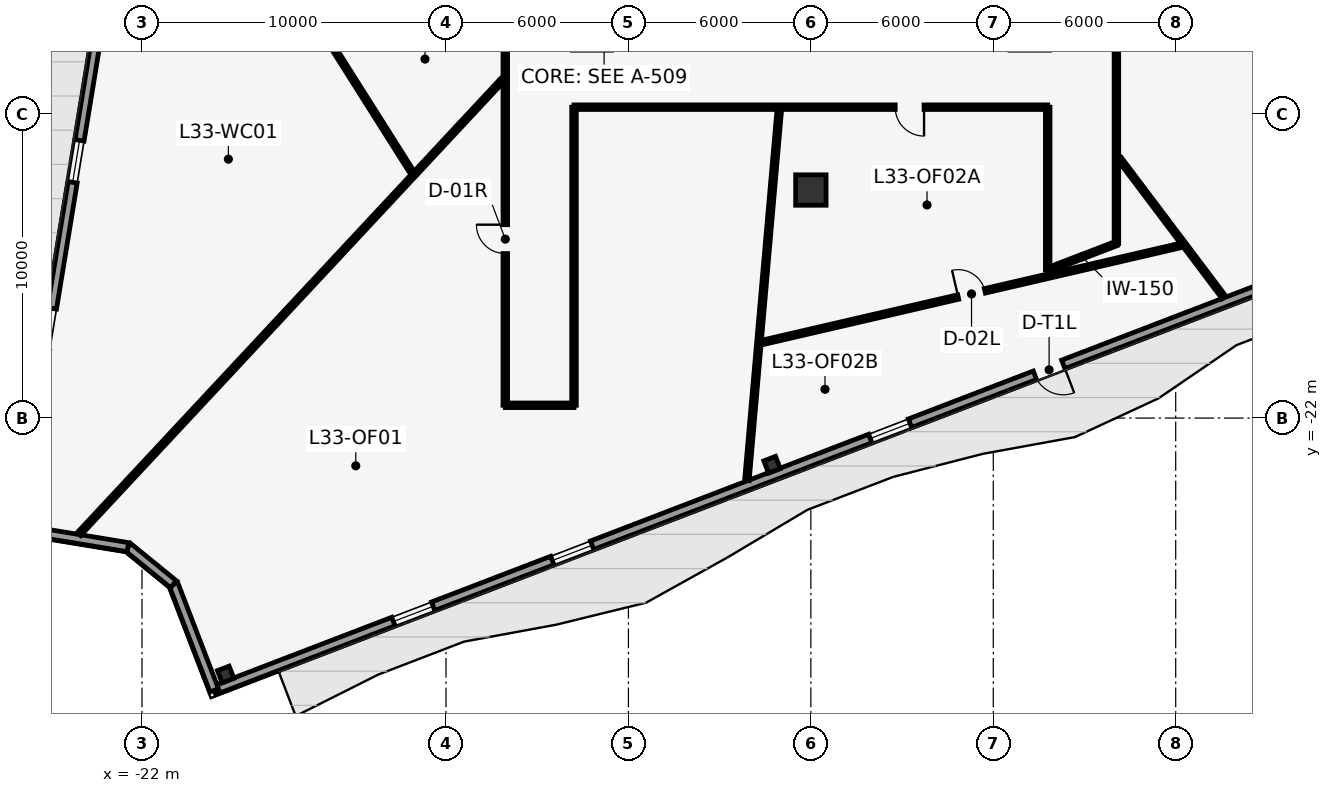
"""IFC4 building model, lengths in metres.
Left out: names, types, materials, properties, quantities, classifications, styles, units other than length and angle.
Written with IfcOpenShell. Run it as: python <this file> out.ifc"""

import sys

from ifc_helpers import new_model, si_unit, direction, frame, frame_2d, origin, origin_2d, place, context, subcontext, project, spatial, rectangle, i_section, extrude, element, fill, save


model = new_model("IFC4")
c1 = context("Model", 3, precision=1e-05, world=origin(), true_north=direction((0.0, 1.0)))
c2 = subcontext(c1, "Body", "Model", "MODEL_VIEW")
j1 = project(units=[si_unit("LENGTHUNIT", "METRE"), si_unit("PLANEANGLEUNIT", "RADIAN")], contexts=[c1])
p1 = place(None, origin())
s1 = spatial("IfcSite", under=j1, at=p1, CompositionType="ELEMENT")
p2 = place(p1, origin())
s2 = spatial("IfcBuilding", under=s1, at=p2, CompositionType="ELEMENT")
p3 = place(p2, frame((0.0, 0.0, 144.5)))
s3 = spatial("IfcBuildingStorey", under=s2, at=p3, CompositionType="ELEMENT", Elevation=144.5)
p4 = place(p3, frame((0.0, -14.5, 0.0), z_axis=(0.0, 0.0, 1.0), x_axis=(1.0, 0.0, 0.0)))
e1 = element("IfcColumn", 1, at=p4, inside=s3, PredefinedType="COLUMN", context=c2, shape_type="SweptSolid", body=[
    extrude(rectangle(XDim=1.0, YDim=1.0, at=origin_2d()), origin(), (0.0, 0.0, 1.0), 4.1),
])
for number, where, z_axis, x_axis in (
    (2, (-19.247, -30.435, 0.0), (0.0, 0.0, 1.0), (0.934, 0.358, 0.0)),
    (3, (-1.275, -23.537, 0.0), (0.0, 0.0, 1.0), (0.934, 0.358, 0.0)),
):
    element("IfcColumn", number, at=place(p3, frame(where, z_axis=z_axis, x_axis=x_axis)), inside=s3, PredefinedType="COLUMN", context=c2, shape_type="SweptSolid", body=[
        extrude(i_section(OverallWidth=0.411, OverallDepth=0.434, WebThickness=0.036, FlangeThickness=0.057, at=origin_2d()), origin(), (0.0, 0.0, 1.0), 4.1),
    ])
p5 = place(p3, frame((35.296, -9.873, 0.0), z_axis=(0.0, 0.0, 1.0), x_axis=(-0.933580612554, -0.35836746485, 0.0)))
e4 = element("IfcWall", 4, at=p5, inside=s3, PredefinedType="STANDARD", context=c2, shape_type="SweptSolid", body=[
    extrude(rectangle(XDim=58.828, YDim=0.3, at=frame_2d((29.414, 0.0))), origin(), (0.0, 0.0, 1.0), 3.85),
])
p6 = place(p5, frame((28.914, 0.0, 0.0)))
e5 = element("IfcOpeningElement", 5, at=p6, cuts=e4, PredefinedType="OPENING", context=c2, shape_type="SweptSolid", body=[
    extrude(rectangle(XDim=1.0, YDim=2.15, at=frame_2d((0.5, 1.075))), frame((0.0, 0.16, 0.0), z_axis=(0.0, -1.0, 0.0), x_axis=(1.0, 0.0, 0.0)), (0.0, 0.0, 1.0), 0.32),
])
p7 = place(p5, frame((6.314, 0.0, 0.85)))
e6 = element("IfcOpeningElement", 6, at=p7, cuts=e4, PredefinedType="OPENING", context=c2, shape_type="SweptSolid", body=[
    extrude(rectangle(XDim=1.4, YDim=2.2, at=frame_2d((0.7, 1.1))), frame((0.0, 0.16, 0.0), z_axis=(0.0, -1.0, 0.0), x_axis=(1.0, 0.0, 0.0)), (0.0, 0.0, 1.0), 0.32),
])
p8 = place(p5, frame((11.914, 0.0, 0.85)))
e7 = element("IfcOpeningElement", 7, at=p8, cuts=e4, PredefinedType="OPENING", context=c2, shape_type="SweptSolid", body=[
    extrude(rectangle(XDim=1.4, YDim=2.2, at=frame_2d((0.7, 1.1))), frame((0.0, 0.16, 0.0), z_axis=(0.0, -1.0, 0.0), x_axis=(1.0, 0.0, 0.0)), (0.0, 0.0, 1.0), 0.32),
])
p9 = place(p5, frame((34.314, 0.0, 0.85)))
e8 = element("IfcOpeningElement", 8, at=p9, cuts=e4, PredefinedType="OPENING", context=c2, shape_type="SweptSolid", body=[
    extrude(rectangle(XDim=1.4, YDim=2.2, at=frame_2d((0.7, 1.1))), frame((0.0, 0.16, 0.0), z_axis=(0.0, -1.0, 0.0), x_axis=(1.0, 0.0, 0.0)), (0.0, 0.0, 1.0), 0.32),
])
p10 = place(p5, frame((45.514, 0.0, 0.85)))
e9 = element("IfcOpeningElement", 9, at=p10, cuts=e4, PredefinedType="OPENING", context=c2, shape_type="SweptSolid", body=[
    extrude(rectangle(XDim=1.4, YDim=2.2, at=frame_2d((0.7, 1.1))), frame((0.0, 0.16, 0.0), z_axis=(0.0, -1.0, 0.0), x_axis=(1.0, 0.0, 0.0)), (0.0, 0.0, 1.0), 0.32),
])
p11 = place(p5, frame((51.114, 0.0, 0.85)))
e10 = element("IfcOpeningElement", 10, at=p11, cuts=e4, PredefinedType="OPENING", context=c2, shape_type="SweptSolid", body=[
    extrude(rectangle(XDim=1.4, YDim=2.2, at=frame_2d((0.7, 1.1))), frame((0.0, 0.16, 0.0), z_axis=(0.0, -1.0, 0.0), x_axis=(1.0, 0.0, 0.0)), (0.0, 0.0, 1.0), 0.32),
])
p12 = place(p3, frame((-19.624, -30.955, 0.0), z_axis=(0.0, 0.0, 1.0), x_axis=(-0.358366059171, 0.933581152142, 0.0)))
e11 = element("IfcWall", 11, at=p12, inside=s3, PredefinedType="STANDARD", context=c2, shape_type="SweptSolid", body=[
    extrude(rectangle(XDim=3.737, YDim=0.3, at=frame_2d((1.868, 0.0))), origin(), (0.0, 0.0, 1.0), 3.85),
])
p13 = place(p3, frame((-20.963, -27.466, 0.0), z_axis=(0.0, 0.0, 1.0), x_axis=(-0.775367830134, 0.631509879569, 0.0)))
e12 = element("IfcWall", 12, at=p13, inside=s3, PredefinedType="STANDARD", context=c2, shape_type="SweptSolid", body=[
    extrude(rectangle(XDim=1.933, YDim=0.3, at=frame_2d((0.967, 0.0))), origin(), (0.0, 0.0, 1.0), 3.85),
])
p14 = place(p3, frame((-22.462, -26.246, 0.0), z_axis=(0.0, 0.0, 1.0), x_axis=(-0.986786597315, 0.16202534172, 0.0)))
e13 = element("IfcWall", 13, at=p14, inside=s3, PredefinedType="STANDARD", context=c2, shape_type="SweptSolid", body=[
    extrude(rectangle(XDim=3.737, YDim=0.3, at=frame_2d((1.868, 0.0))), origin(), (0.0, 0.0, 1.0), 3.85),
])
p15 = place(p3, frame((-26.15, -25.64, 0.0), z_axis=(0.0, 0.0, 1.0), x_axis=(0.161975761987, 0.986794736776, 0.0)))
e14 = element("IfcWall", 14, at=p15, inside=s3, PredefinedType="STANDARD", context=c2, shape_type="SweptSolid", body=[
    extrude(rectangle(XDim=58.093, YDim=0.3, at=frame_2d((29.046, 0.0))), origin(), (0.0, 0.0, 1.0), 3.85),
])
p16 = place(p15, frame((28.546, 0.0, 0.0)))
e15 = element("IfcOpeningElement", 15, at=p16, cuts=e14, PredefinedType="OPENING", context=c2, shape_type="SweptSolid", body=[
    extrude(rectangle(XDim=1.0, YDim=2.15, at=frame_2d((0.5, 1.075))), frame((0.0, 0.16, 0.0), z_axis=(0.0, -1.0, 0.0), x_axis=(1.0, 0.0, 0.0)), (0.0, 0.0, 1.0), 0.32),
])
p17 = place(p15, frame((5.947, 0.0, 0.85)))
e16 = element("IfcOpeningElement", 16, at=p17, cuts=e14, PredefinedType="OPENING", context=c2, shape_type="SweptSolid", body=[
    extrude(rectangle(XDim=1.4, YDim=2.2, at=frame_2d((0.7, 1.1))), frame((0.0, 0.16, 0.0), z_axis=(0.0, -1.0, 0.0), x_axis=(1.0, 0.0, 0.0)), (0.0, 0.0, 1.0), 0.32),
])
p18 = place(p15, frame((11.546, 0.0, 0.85)))
e17 = element("IfcOpeningElement", 17, at=p18, cuts=e14, PredefinedType="OPENING", context=c2, shape_type="SweptSolid", body=[
    extrude(rectangle(XDim=1.4, YDim=2.2, at=frame_2d((0.7, 1.1))), frame((0.0, 0.16, 0.0), z_axis=(0.0, -1.0, 0.0), x_axis=(1.0, 0.0, 0.0)), (0.0, 0.0, 1.0), 0.32),
])
p19 = place(p15, frame((17.146, 0.0, 0.85)))
e18 = element("IfcOpeningElement", 18, at=p19, cuts=e14, PredefinedType="OPENING", context=c2, shape_type="SweptSolid", body=[
    extrude(rectangle(XDim=1.4, YDim=2.2, at=frame_2d((0.7, 1.1))), frame((0.0, 0.16, 0.0), z_axis=(0.0, -1.0, 0.0), x_axis=(1.0, 0.0, 0.0)), (0.0, 0.0, 1.0), 0.32),
])
p20 = place(p15, frame((33.947, 0.0, 0.85)))
e19 = element("IfcOpeningElement", 19, at=p20, cuts=e14, PredefinedType="OPENING", context=c2, shape_type="SweptSolid", body=[
    extrude(rectangle(XDim=1.4, YDim=2.2, at=frame_2d((0.7, 1.1))), frame((0.0, 0.16, 0.0), z_axis=(0.0, -1.0, 0.0), x_axis=(1.0, 0.0, 0.0)), (0.0, 0.0, 1.0), 0.32),
])
p21 = place(p15, frame((39.546, 0.0, 0.85)))
e20 = element("IfcOpeningElement", 20, at=p21, cuts=e14, PredefinedType="OPENING", context=c2, shape_type="SweptSolid", body=[
    extrude(rectangle(XDim=1.4, YDim=2.2, at=frame_2d((0.7, 1.1))), frame((0.0, 0.16, 0.0), z_axis=(0.0, -1.0, 0.0), x_axis=(1.0, 0.0, 0.0)), (0.0, 0.0, 1.0), 0.32),
])
p22 = place(p15, frame((45.146, 0.0, 0.85)))
e21 = element("IfcOpeningElement", 21, at=p22, cuts=e14, PredefinedType="OPENING", context=c2, shape_type="SweptSolid", body=[
    extrude(rectangle(XDim=1.4, YDim=2.2, at=frame_2d((0.7, 1.1))), frame((0.0, 0.16, 0.0), z_axis=(0.0, -1.0, 0.0), x_axis=(1.0, 0.0, 0.0)), (0.0, 0.0, 1.0), 0.32),
])
p23 = place(p15, frame((50.747, 0.0, 0.85)))
e22 = element("IfcOpeningElement", 22, at=p23, cuts=e14, PredefinedType="OPENING", context=c2, shape_type="SweptSolid", body=[
    extrude(rectangle(XDim=1.4, YDim=2.2, at=frame_2d((0.7, 1.1))), frame((0.0, 0.16, 0.0), z_axis=(0.0, -1.0, 0.0), x_axis=(1.0, 0.0, 0.0)), (0.0, 0.0, 1.0), 0.32),
])
p24 = place(p3, frame((10.05, -16.26, 0.0), z_axis=(0.0, 0.0, 1.0), x_axis=(-0.933561171802, -0.358418105713, 0.0)))
e23 = element("IfcWall", 23, at=p24, inside=s3, PredefinedType="PARTITIONING", context=c2, shape_type="SweptSolid", body=[
    extrude(rectangle(XDim=2.421, YDim=0.15, at=frame_2d((1.21, 0.0))), origin(), (0.0, 0.0, 1.0), 3.85),
])
p25 = place(p3, frame((7.79, -17.127, 0.0), z_axis=(0.0, 0.0, 1.0), x_axis=(0.0, 1.0, 0.0)))
e24 = element("IfcWall", 24, at=p25, inside=s3, PredefinedType="PARTITIONING", context=c2, shape_type="SweptSolid", body=[
    extrude(rectangle(XDim=5.352, YDim=0.15, at=frame_2d((2.676, 0.0))), origin(), (0.0, 0.0, 1.0), 3.85),
])
p26 = place(p3, frame((7.79, -11.775, 0.0), z_axis=(0.0, 0.0, 1.0), x_axis=(-1.0, 0.0, 0.0)))
e25 = element("IfcWall", 25, at=p26, inside=s3, PredefinedType="PARTITIONING", context=c2, shape_type="SweptSolid", body=[
    extrude(rectangle(XDim=15.58, YDim=0.15, at=frame_2d((7.79, 0.0))), origin(), (0.0, 0.0, 1.0), 3.85),
])
p27 = place(p26, frame((4.067, 0.0, 0.0)))
e26 = element("IfcOpeningElement", 26, at=p27, cuts=e25, PredefinedType="OPENING", context=c2, shape_type="SweptSolid", body=[
    extrude(rectangle(XDim=0.95, YDim=2.15, at=frame_2d((0.475, 1.075))), frame((0.0, 0.085, 0.0), z_axis=(0.0, -1.0, 0.0), x_axis=(1.0, 0.0, 0.0)), (0.0, 0.0, 1.0), 0.17),
])
p28 = place(p3, frame((-7.79, -11.775, 0.0), z_axis=(0.0, 0.0, 1.0), x_axis=(0.0, -1.0, 0.0)))
e27 = element("IfcWall", 27, at=p28, inside=s3, PredefinedType="PARTITIONING", context=c2, shape_type="SweptSolid", body=[
    extrude(rectangle(XDim=9.805, YDim=0.15, at=frame_2d((4.903, 0.0))), origin(), (0.0, 0.0, 1.0), 3.85),
])
p29 = place(p3, frame((-7.79, -21.58, 0.0), z_axis=(0.0, 0.0, 1.0), x_axis=(-1.0, 0.0, 0.0)))
e28 = element("IfcWall", 28, at=p29, inside=s3, PredefinedType="PARTITIONING", context=c2, shape_type="SweptSolid", body=[
    extrude(rectangle(XDim=2.26, YDim=0.15, at=frame_2d((1.13, 0.0))), origin(), (0.0, 0.0, 1.0), 3.85),
])
p30 = place(p3, frame((-10.05, -21.58, 0.0), z_axis=(0.0, 0.0, 1.0), x_axis=(0.0, 1.0, 0.0)))
e29 = element("IfcWall", 29, at=p30, inside=s3, PredefinedType="PARTITIONING", context=c2, shape_type="SweptSolid", body=[
    extrude(rectangle(XDim=19.45, YDim=0.15, at=frame_2d((9.725, 0.0))), origin(), (0.0, 0.0, 1.0), 3.85),
])
p31 = place(p30, frame((4.99, 0.0, 0.0)))
e30 = element("IfcOpeningElement", 30, at=p31, cuts=e29, PredefinedType="OPENING", context=c2, shape_type="SweptSolid", body=[
    extrude(rectangle(XDim=0.95, YDim=2.15, at=frame_2d((0.475, 1.075))), frame((0.0, 0.085, 0.0), z_axis=(0.0, -1.0, 0.0), x_axis=(1.0, 0.0, 0.0)), (0.0, 0.0, 1.0), 0.17),
])
p32 = place(p3, frame((10.05, -2.13, 0.0), z_axis=(0.0, 0.0, 1.0), x_axis=(0.0, -1.0, 0.0)))
e31 = element("IfcWall", 31, at=p32, inside=s3, PredefinedType="PARTITIONING", context=c2, shape_type="SweptSolid", body=[
    extrude(rectangle(XDim=14.13, YDim=0.15, at=frame_2d((7.065, 0.0))), origin(), (0.0, 0.0, 1.0), 3.85),
])
p33 = place(p32, frame((5.902, 0.0, 0.0)))
e32 = element("IfcOpeningElement", 32, at=p33, cuts=e31, PredefinedType="OPENING", context=c2, shape_type="SweptSolid", body=[
    extrude(rectangle(XDim=0.95, YDim=2.15, at=frame_2d((0.475, 1.075))), frame((0.0, 0.085, 0.0), z_axis=(0.0, -1.0, 0.0), x_axis=(1.0, 0.0, 0.0)), (0.0, 0.0, 1.0), 0.17),
])
p34 = place(p3, frame((-10.155, -10.89, 0.0), z_axis=(0.0, 0.0, 1.0), x_axis=(-0.681994218346, -0.731357563811, 0.0)))
e33 = element("IfcWall", 33, at=p34, inside=s3, PredefinedType="PARTITIONING", context=c2, shape_type="SweptSolid", body=[
    extrude(rectangle(XDim=20.406, YDim=0.15, at=frame_2d((10.203, 0.0))), origin(), (0.0, 0.0, 1.0), 3.85),
])
p35 = place(p3, frame((-1.039, -11.88, 0.0), z_axis=(0.0, 0.0, 1.0), x_axis=(-0.087170172266, -0.996193435567, 0.0)))
e34 = element("IfcWall", 34, at=p35, inside=s3, PredefinedType="PARTITIONING", context=c2, shape_type="SweptSolid", body=[
    extrude(rectangle(XDim=12.22, YDim=0.15, at=frame_2d((6.11, 0.0))), origin(), (0.0, 0.0, 1.0), 3.85),
])
p36 = place(p3, frame((10.155, -13.476, 0.0), z_axis=(0.0, 0.0, 1.0), x_axis=(0.601807099294, -0.798641481041, 0.0)))
e35 = element("IfcWall", 35, at=p36, inside=s3, PredefinedType="PARTITIONING", context=c2, shape_type="SweptSolid", body=[
    extrude(rectangle(XDim=5.702, YDim=0.15, at=frame_2d((2.851, 0.0))), origin(), (0.0, 0.0, 1.0), 3.85),
])
p37 = place(p3, frame((10.155, -3.497, 0.0), z_axis=(0.0, 0.0, 1.0), x_axis=(0.945516019474, -0.325575577889, 0.0)))
e36 = element("IfcWall", 36, at=p37, inside=s3, PredefinedType="PARTITIONING", context=c2, shape_type="SweptSolid", body=[
    extrude(rectangle(XDim=23.021, YDim=0.15, at=frame_2d((11.511, 0.0))), origin(), (0.0, 0.0, 1.0), 2.898),
])
p38 = place(p3, frame((-20.754, -1.841, 0.0), z_axis=(0.0, 0.0, 1.0), x_axis=(0.53443787688, -0.84520775893, 0.0)))
e37 = element("IfcWall", 37, at=p38, inside=s3, PredefinedType="PARTITIONING", context=c2, shape_type="SweptSolid", body=[
    extrude(rectangle(XDim=14.368, YDim=0.15, at=frame_2d((7.184, 0.0))), origin(), (0.0, 0.0, 1.0), 3.85),
])
p39 = place(p38, frame((6.709, 0.0, 0.0)))
e38 = element("IfcOpeningElement", 38, at=p39, cuts=e37, PredefinedType="OPENING", context=c2, shape_type="SweptSolid", body=[
    extrude(rectangle(XDim=0.95, YDim=2.15, at=frame_2d((0.475, 1.075))), frame((0.0, 0.085, 0.0), z_axis=(0.0, -1.0, 0.0), x_axis=(1.0, 0.0, 0.0)), (0.0, 0.0, 1.0), 0.17),
])
p40 = place(p3, frame((-1.684, -19.533, 0.0), z_axis=(0.0, 0.0, 1.0), x_axis=(0.974168973581, 0.225820306685, 0.0)))
e39 = element("IfcWall", 39, at=p40, inside=s3, PredefinedType="PARTITIONING", context=c2, shape_type="SweptSolid", body=[
    extrude(rectangle(XDim=14.307, YDim=0.15, at=frame_2d((7.153, 0.0))), origin(), (0.0, 0.0, 1.0), 3.85),
])
p41 = place(p40, frame((6.703, 0.0, 0.0)))
e40 = element("IfcOpeningElement", 40, at=p41, cuts=e39, PredefinedType="OPENING", context=c2, shape_type="SweptSolid", body=[
    extrude(rectangle(XDim=0.9, YDim=2.1, at=frame_2d((0.45, 1.05))), frame((0.0, 0.085, 0.0), z_axis=(0.0, -1.0, 0.0), x_axis=(1.0, 0.0, 0.0)), (0.0, 0.0, 1.0), 0.17),
])
p42 = place(p6, origin())
e41 = element("IfcDoor", 41, at=p42, inside=s3, OperationType="SINGLE_SWING_LEFT", PredefinedType="DOOR", context=c2, shape_type="SweptSolid", body=[
    extrude(rectangle(XDim=1.0, YDim=2.15, at=frame_2d((0.5, 1.075))), frame((0.0, 0.025, 0.0), z_axis=(0.0, -1.0, 0.0), x_axis=(1.0, 0.0, 0.0)), (0.0, 0.0, 1.0), 0.05),
])
fill(e5, e41)
p43 = place(p9, origin())
e42 = element("IfcWindow", 42, at=p43, inside=s3, PartitioningType="SINGLE_PANEL", PredefinedType="WINDOW", context=c2, shape_type="SweptSolid", body=[
    extrude(rectangle(XDim=1.4, YDim=2.2, at=frame_2d((0.7, 1.1))), frame((0.0, 0.03, 0.0), z_axis=(0.0, -1.0, 0.0), x_axis=(1.0, 0.0, 0.0)), (0.0, 0.0, 1.0), 0.06),
])
fill(e8, e42)
p44 = place(p10, origin())
e43 = element("IfcWindow", 43, at=p44, inside=s3, PartitioningType="SINGLE_PANEL", PredefinedType="WINDOW", context=c2, shape_type="SweptSolid", body=[
    extrude(rectangle(XDim=1.4, YDim=2.2, at=frame_2d((0.7, 1.1))), frame((0.0, 0.03, 0.0), z_axis=(0.0, -1.0, 0.0), x_axis=(1.0, 0.0, 0.0)), (0.0, 0.0, 1.0), 0.06),
])
fill(e9, e43)
p45 = place(p11, origin())
e44 = element("IfcWindow", 44, at=p45, inside=s3, PartitioningType="SINGLE_PANEL", PredefinedType="WINDOW", context=c2, shape_type="SweptSolid", body=[
    extrude(rectangle(XDim=1.4, YDim=2.2, at=frame_2d((0.7, 1.1))), frame((0.0, 0.03, 0.0), z_axis=(0.0, -1.0, 0.0), x_axis=(1.0, 0.0, 0.0)), (0.0, 0.0, 1.0), 0.06),
])
fill(e10, e44)
p46 = place(p17, origin())
e45 = element("IfcWindow", 45, at=p46, inside=s3, PartitioningType="SINGLE_PANEL", PredefinedType="WINDOW", context=c2, shape_type="SweptSolid", body=[
    extrude(rectangle(XDim=1.4, YDim=2.2, at=frame_2d((0.7, 1.1))), frame((0.0, 0.03, 0.0), z_axis=(0.0, -1.0, 0.0), x_axis=(1.0, 0.0, 0.0)), (0.0, 0.0, 1.0), 0.06),
])
fill(e16, e45)
p47 = place(p18, origin())
e46 = element("IfcWindow", 46, at=p47, inside=s3, PartitioningType="SINGLE_PANEL", PredefinedType="WINDOW", context=c2, shape_type="SweptSolid", body=[
    extrude(rectangle(XDim=1.4, YDim=2.2, at=frame_2d((0.7, 1.1))), frame((0.0, 0.03, 0.0), z_axis=(0.0, -1.0, 0.0), x_axis=(1.0, 0.0, 0.0)), (0.0, 0.0, 1.0), 0.06),
])
fill(e17, e46)
p48 = place(p41, origin())
e47 = element("IfcDoor", 47, at=p48, inside=s3, OperationType="SINGLE_SWING_LEFT", PredefinedType="DOOR", context=c2, shape_type="SweptSolid", body=[
    extrude(rectangle(XDim=0.9, YDim=2.1, at=frame_2d((0.45, 1.05))), frame((0.0, 0.025, 0.0), z_axis=(0.0, -1.0, 0.0), x_axis=(1.0, 0.0, 0.0)), (0.0, 0.0, 1.0), 0.05),
])
fill(e40, e47)
p49 = place(p31, origin())
e48 = element("IfcDoor", 48, at=p49, inside=s3, OperationType="SINGLE_SWING_RIGHT", PredefinedType="DOOR", context=c2, shape_type="SweptSolid", body=[
    extrude(rectangle(XDim=0.95, YDim=2.15, at=frame_2d((0.475, 1.075))), frame((0.0, 0.025, 0.0), z_axis=(0.0, -1.0, 0.0), x_axis=(1.0, 0.0, 0.0)), (0.0, 0.0, 1.0), 0.05),
])
fill(e30, e48)
p50 = place(p27, origin())
e49 = element("IfcDoor", 49, at=p50, inside=s3, OperationType="SINGLE_SWING_LEFT", PredefinedType="DOOR", context=c2, shape_type="SweptSolid", body=[
    extrude(rectangle(XDim=0.95, YDim=2.15, at=frame_2d((0.475, 1.075))), frame((0.0, 0.025, 0.0), z_axis=(0.0, -1.0, 0.0), x_axis=(1.0, 0.0, 0.0)), (0.0, 0.0, 1.0), 0.05),
])
fill(e26, e49)
save(model, sys.argv[1])
